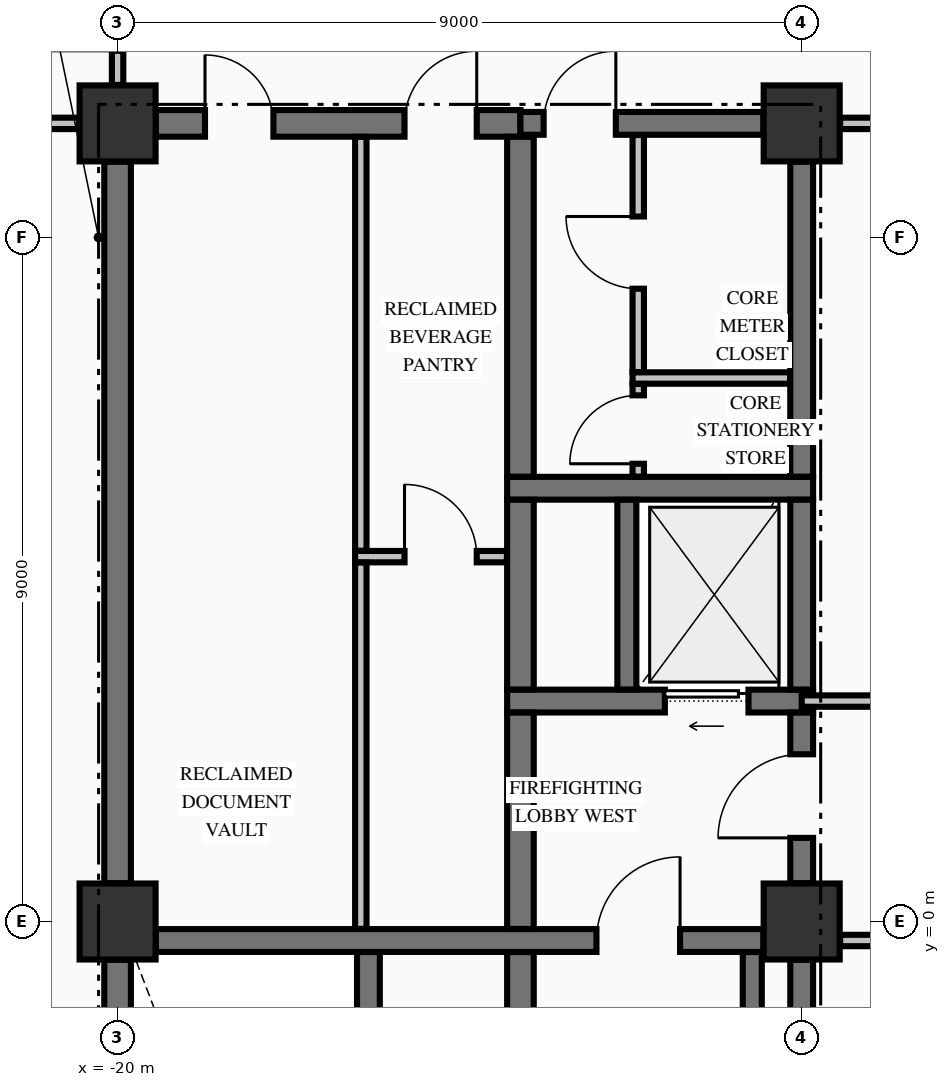
"""IFC4 building model, lengths in metres.
Left out: names, types, materials, properties, quantities, classifications, styles, units other than length and angle.
Written with IfcOpenShell. Run it as: python <this file> out.ifc"""

import sys

from ifc_helpers import new_model, si_unit, direction, frame, frame_2d, origin, origin_2d, place, context, subcontext, project, spatial, rectangle, extrude, element, fill, save


model = new_model("IFC4")
c1 = context("Model", 3, precision=1e-05, world=origin(), true_north=direction((0.0, 1.0)))
c2 = subcontext(c1, "Body", "Model", "MODEL_VIEW")
j1 = project(units=[si_unit("LENGTHUNIT", "METRE"), si_unit("PLANEANGLEUNIT", "RADIAN")], contexts=[c1])
p1 = place(None, origin())
s1 = spatial("IfcSite", under=j1, at=p1, CompositionType="ELEMENT")
p2 = place(p1, origin())
s2 = spatial("IfcBuilding", under=s1, at=p2, CompositionType="ELEMENT")
p3 = place(p2, frame((0.0, 0.0, 116.35)))
s3 = spatial("IfcBuildingStorey", under=s2, at=p3, CompositionType="ELEMENT", Elevation=116.35)
for number, where, z_axis, x_axis in (
    (1, (-20.0, 10.5, -0.425), (0.0, 0.0, 1.0), (1.0, 0.0, 0.0)),
    (2, (-11.0, 0.0, -0.425), (0.0, 0.0, 1.0), (1.0, 0.0, 0.0)),
    (3, (-11.0, 10.5, -0.425), (0.0, 0.0, 1.0), (1.0, 0.0, 0.0)),
    (4, (-20.0, 0.0, -0.425), (0.0, 0.0, 1.0), (1.0, 0.0, 0.0)),
):
    element("IfcColumn", number, at=place(p3, frame(where, z_axis=z_axis, x_axis=x_axis)), inside=s3, PredefinedType="COLUMN", context=c2, shape_type="SweptSolid", body=[
        extrude(rectangle(XDim=1.0, YDim=1.0, at=origin_2d()), origin(), (0.0, 0.0, 1.0), 5.0),
    ])
p4 = place(p3, frame((-19.496, -0.25, 0.0), z_axis=(0.0, 0.0, 1.0), x_axis=(1.0, 0.0, 0.0)))
e5 = element("IfcWall", 5, at=p4, inside=s3, PredefinedType="SHEAR", context=c2, shape_type="SweptSolid", body=[
    extrude(rectangle(XDim=7.992, YDim=0.3, at=frame_2d((3.996, 0.0))), origin(), (0.0, 0.0, 1.0), 4.575),
])
p5 = place(p4, frame((5.796, 0.0, 0.0)))
e6 = element("IfcOpeningElement", 6, at=p5, cuts=e5, PredefinedType="OPENING", context=c2, shape_type="SweptSolid", body=[
    extrude(rectangle(XDim=1.1, YDim=2.15, at=frame_2d((0.55, 1.075))), frame((0.0, 0.16, 0.0), z_axis=(0.0, -1.0, 0.0), x_axis=(1.0, 0.0, 0.0)), (0.0, 0.0, 1.0), 0.32),
])
p6 = place(p3, frame((-14.875, 2.9, 0.0), z_axis=(0.0, 0.0, 1.0), x_axis=(1.0, 0.0, 0.0)))
e7 = element("IfcWall", 7, at=p6, inside=s3, PredefinedType="SHEAR", context=c2, shape_type="SweptSolid", body=[
    extrude(rectangle(XDim=4.025, YDim=0.3, at=frame_2d((2.012, 0.0))), origin(), (0.0, 0.0, 1.0), 4.575),
])
p7 = place(p6, frame((2.075, 0.0, 0.0)))
e8 = element("IfcOpeningElement", 8, at=p7, cuts=e7, PredefinedType="OPENING", context=c2, shape_type="SweptSolid", body=[
    extrude(rectangle(XDim=1.1, YDim=2.2, at=frame_2d((0.55, 1.1))), frame((0.0, 0.16, 0.0), z_axis=(0.0, -1.0, 0.0), x_axis=(1.0, 0.0, 0.0)), (0.0, 0.0, 1.0), 0.32),
])
p8 = place(p3, frame((-14.875, 5.7, 0.0), z_axis=(0.0, 0.0, 1.0), x_axis=(1.0, 0.0, 0.0)))
e9 = element("IfcWall", 9, at=p8, inside=s3, PredefinedType="SHEAR", context=c2, shape_type="SweptSolid", body=[
    extrude(rectangle(XDim=4.025, YDim=0.3, at=frame_2d((2.012, 0.0))), origin(), (0.0, 0.0, 1.0), 4.575),
])
p9 = place(p3, frame((-19.496, 10.5, 0.0), z_axis=(0.0, 0.0, 1.0), x_axis=(1.0, 0.0, 0.0)))
e10 = element("IfcWall", 10, at=p9, inside=s3, PredefinedType="SHEAR", context=c2, shape_type="SweptSolid", body=[
    extrude(rectangle(XDim=4.796, YDim=0.35, at=frame_2d((2.398, 0.0))), origin(), (0.0, 0.0, 1.0), 4.575),
])
p10 = place(p9, frame((0.646, 0.0, 0.0)))
e11 = element("IfcOpeningElement", 11, at=p10, cuts=e10, PredefinedType="OPENING", context=c2, shape_type="SweptSolid", body=[
    extrude(rectangle(XDim=0.9, YDim=2.15, at=frame_2d((0.45, 1.075))), frame((0.0, 0.185, 0.0), z_axis=(0.0, -1.0, 0.0), x_axis=(1.0, 0.0, 0.0)), (0.0, 0.0, 1.0), 0.37),
])
p11 = place(p9, frame((3.271, 0.0, 0.0)))
e12 = element("IfcOpeningElement", 12, at=p11, cuts=e10, PredefinedType="OPENING", context=c2, shape_type="SweptSolid", body=[
    extrude(rectangle(XDim=0.95, YDim=2.15, at=frame_2d((0.475, 1.075))), frame((0.0, 0.185, 0.0), z_axis=(0.0, -1.0, 0.0), x_axis=(1.0, 0.0, 0.0)), (0.0, 0.0, 1.0), 0.37),
])
p12 = place(p3, frame((-14.7, 10.5, 0.0), z_axis=(0.0, 0.0, 1.0), x_axis=(1.0, 0.0, 0.0)))
e13 = element("IfcWall", 13, at=p12, inside=s3, PredefinedType="SHEAR", context=c2, shape_type="SweptSolid", body=[
    extrude(rectangle(XDim=3.196, YDim=0.3, at=frame_2d((1.598, 0.0))), origin(), (0.0, 0.0, 1.0), 4.575),
])
p13 = place(p12, frame((0.305, 0.0, 0.0)))
e14 = element("IfcOpeningElement", 14, at=p13, cuts=e13, PredefinedType="OPENING", context=c2, shape_type="SweptSolid", body=[
    extrude(rectangle(XDim=0.95, YDim=2.15, at=frame_2d((0.475, 1.075))), frame((0.0, 0.16, 0.0), z_axis=(0.0, -1.0, 0.0), x_axis=(1.0, 0.0, 0.0)), (0.0, 0.0, 1.0), 0.32),
])
p14 = place(p3, frame((-10.494, -0.25, 0.0), z_axis=(0.0, 0.0, 1.0), x_axis=(1.0, 0.0, 0.0)))
e15 = element("IfcWall", 15, at=p14, inside=s3, PredefinedType="PARTITIONING", context=c2, shape_type="SweptSolid", body=[
    extrude(rectangle(XDim=20.988, YDim=0.15, at=frame_2d((10.494, 0.0))), origin(), (0.0, 0.0, 1.0), 4.575),
])
p15 = place(p14, frame((15.394, 0.0, 0.0)))
e16 = element("IfcOpeningElement", 16, at=p15, cuts=e15, PredefinedType="OPENING", context=c2, shape_type="SweptSolid", body=[
    extrude(rectangle(XDim=1.1, YDim=2.15, at=frame_2d((0.55, 1.075))), frame((0.0, 0.085, 0.0), z_axis=(0.0, -1.0, 0.0), x_axis=(1.0, 0.0, 0.0)), (0.0, 0.0, 1.0), 0.17),
])
p16 = place(p14, frame((6.639, 0.0, 0.0)))
e17 = element("IfcOpeningElement", 17, at=p16, cuts=e15, PredefinedType="OPENING", context=c2, shape_type="SweptSolid", body=[
    extrude(rectangle(XDim=1.05, YDim=2.15, at=frame_2d((0.525, 1.075))), frame((0.0, 0.085, 0.0), z_axis=(0.0, -1.0, 0.0), x_axis=(1.0, 0.0, 0.0)), (0.0, 0.0, 1.0), 0.17),
])
p17 = place(p14, frame((18.799, 0.0, 0.0)))
e18 = element("IfcOpeningElement", 18, at=p17, cuts=e15, PredefinedType="OPENING", context=c2, shape_type="SweptSolid", body=[
    extrude(rectangle(XDim=0.95, YDim=2.15, at=frame_2d((0.475, 1.075))), frame((0.0, 0.085, 0.0), z_axis=(0.0, -1.0, 0.0), x_axis=(1.0, 0.0, 0.0)), (0.0, 0.0, 1.0), 0.17),
])
p18 = place(p3, frame((-11.0, 2.9, 0.0), z_axis=(0.0, 0.0, 1.0), x_axis=(1.0, 0.0, 0.0)))
e19 = element("IfcWall", 19, at=p18, inside=s3, PredefinedType="PARTITIONING", context=c2, shape_type="SweptSolid", body=[
    extrude(rectangle(XDim=22.0, YDim=0.15, at=frame_2d((11.0, 0.0))), origin(), (0.0, 0.0, 1.0), 4.575),
])
p19 = place(p18, frame((15.9, 0.0, 0.0)))
e20 = element("IfcOpeningElement", 20, at=p19, cuts=e19, PredefinedType="OPENING", context=c2, shape_type="SweptSolid", body=[
    extrude(rectangle(XDim=1.1, YDim=2.15, at=frame_2d((0.55, 1.075))), frame((0.0, 0.085, 0.0), z_axis=(0.0, -1.0, 0.0), x_axis=(1.0, 0.0, 0.0)), (0.0, 0.0, 1.0), 0.17),
])
p20 = place(p18, frame((7.145, 0.0, 0.0)))
e21 = element("IfcOpeningElement", 21, at=p20, cuts=e19, PredefinedType="OPENING", context=c2, shape_type="SweptSolid", body=[
    extrude(rectangle(XDim=1.05, YDim=2.15, at=frame_2d((0.525, 1.075))), frame((0.0, 0.085, 0.0), z_axis=(0.0, -1.0, 0.0), x_axis=(1.0, 0.0, 0.0)), (0.0, 0.0, 1.0), 0.17),
])
p21 = place(p18, frame((19.23, 0.0, 0.0)))
e22 = element("IfcOpeningElement", 22, at=p21, cuts=e19, PredefinedType="OPENING", context=c2, shape_type="SweptSolid", body=[
    extrude(rectangle(XDim=1.1, YDim=2.15, at=frame_2d((0.55, 1.075))), frame((0.0, 0.085, 0.0), z_axis=(0.0, -1.0, 0.0), x_axis=(1.0, 0.0, 0.0)), (0.0, 0.0, 1.0), 0.17),
])
p22 = place(p3, frame((-16.875, 4.8, 0.0), z_axis=(0.0, 0.0, 1.0), x_axis=(1.0, 0.0, 0.0)))
e23 = element("IfcWall", 23, at=p22, inside=s3, PredefinedType="PARTITIONING", context=c2, shape_type="SweptSolid", body=[
    extrude(rectangle(XDim=1.997, YDim=0.15, at=frame_2d((0.999, 0.0))), origin(), (0.0, 0.0, 1.0), 4.575),
])
p23 = place(p22, frame((0.65, 0.0, 0.0)))
e24 = element("IfcOpeningElement", 24, at=p23, cuts=e23, PredefinedType="OPENING", context=c2, shape_type="SweptSolid", body=[
    extrude(rectangle(XDim=0.95, YDim=2.15, at=frame_2d((0.475, 1.075))), frame((0.0, 0.085, 0.0), z_axis=(0.0, -1.0, 0.0), x_axis=(1.0, 0.0, 0.0)), (0.0, 0.0, 1.0), 0.17),
])
p24 = place(p3, frame((-13.225, 7.15, 0.0), z_axis=(0.0, 0.0, 1.0), x_axis=(1.0, 0.0, 0.0)))
e25 = element("IfcWall", 25, at=p24, inside=s3, PredefinedType="PARTITIONING", context=c2, shape_type="SweptSolid", body=[
    extrude(rectangle(XDim=2.072, YDim=0.15, at=frame_2d((1.036, 0.0))), origin(), (0.0, 0.0, 1.0), 4.575),
])
p25 = place(p3, frame((-22.835, 10.5, 0.0), z_axis=(0.0, 0.0, 1.0), x_axis=(1.0, 0.0, 0.0)))
e26 = element("IfcWall", 26, at=p25, inside=s3, PredefinedType="PARTITIONING", context=c2, shape_type="SweptSolid", body=[
    extrude(rectangle(XDim=2.329, YDim=0.15, at=frame_2d((1.165, 0.0))), origin(), (0.0, 0.0, 1.0), 4.575),
])
p26 = place(p25, frame((0.835, 0.0, 0.0)))
e27 = element("IfcOpeningElement", 27, at=p26, cuts=e26, PredefinedType="OPENING", context=c2, shape_type="SweptSolid", body=[
    extrude(rectangle(XDim=1.0, YDim=2.15, at=frame_2d((0.5, 1.075))), frame((0.0, 0.085, 0.0), z_axis=(0.0, -1.0, 0.0), x_axis=(1.0, 0.0, 0.0)), (0.0, 0.0, 1.0), 0.17),
])
p27 = place(p3, frame((-10.494, 10.5, 0.0), z_axis=(0.0, 0.0, 1.0), x_axis=(1.0, 0.0, 0.0)))
e28 = element("IfcWall", 28, at=p27, inside=s3, PredefinedType="PARTITIONING", context=c2, shape_type="SweptSolid", body=[
    extrude(rectangle(XDim=20.988, YDim=0.15, at=frame_2d((10.494, 0.0))), origin(), (0.0, 0.0, 1.0), 4.575),
])
p28 = place(p27, frame((15.394, 0.0, 0.0)))
e29 = element("IfcOpeningElement", 29, at=p28, cuts=e28, PredefinedType="OPENING", context=c2, shape_type="SweptSolid", body=[
    extrude(rectangle(XDim=1.1, YDim=2.15, at=frame_2d((0.55, 1.075))), frame((0.0, 0.085, 0.0), z_axis=(0.0, -1.0, 0.0), x_axis=(1.0, 0.0, 0.0)), (0.0, 0.0, 1.0), 0.17),
])
p29 = place(p3, frame((-20.0, -9.446, 0.0), z_axis=(0.0, 0.0, 1.0), x_axis=(0.0, 1.0, 0.0)))
e30 = element("IfcWall", 30, at=p29, inside=s3, PredefinedType="SHEAR", context=c2, shape_type="SweptSolid", body=[
    extrude(rectangle(XDim=8.942, YDim=0.35, at=frame_2d((4.471, 0.0))), origin(), (0.0, 0.0, 1.0), 4.575),
])
p30 = place(p3, frame((-20.0, 0.504, 0.0), z_axis=(0.0, 0.0, 1.0), x_axis=(0.0, 1.0, 0.0)))
e31 = element("IfcWall", 31, at=p30, inside=s3, PredefinedType="SHEAR", context=c2, shape_type="SweptSolid", body=[
    extrude(rectangle(XDim=9.492, YDim=0.35, at=frame_2d((4.746, 0.0))), origin(), (0.0, 0.0, 1.0), 4.575),
])
p31 = place(p3, frame((-16.7, -9.773, 0.0), z_axis=(0.0, 0.0, 1.0), x_axis=(0.0, 1.0, 0.0)))
e32 = element("IfcWall", 32, at=p31, inside=s3, PredefinedType="SHEAR", context=c2, shape_type="SweptSolid", body=[
    extrude(rectangle(XDim=9.371, YDim=0.3, at=frame_2d((4.686, 0.0))), origin(), (0.0, 0.0, 1.0), 4.575),
])
p32 = place(p3, frame((-14.7, -9.773, 0.0), z_axis=(0.0, 0.0, 1.0), x_axis=(0.0, 1.0, 0.0)))
e33 = element("IfcWall", 33, at=p32, inside=s3, PredefinedType="SHEAR", context=c2, shape_type="SweptSolid", body=[
    extrude(rectangle(XDim=9.371, YDim=0.35, at=frame_2d((4.686, 0.0))), origin(), (0.0, 0.0, 1.0), 4.575),
])
p33 = place(p3, frame((-14.7, -0.098, 0.0), z_axis=(0.0, 0.0, 1.0), x_axis=(0.0, 1.0, 0.0)))
e34 = element("IfcWall", 34, at=p33, inside=s3, PredefinedType="SHEAR", context=c2, shape_type="SweptSolid", body=[
    extrude(rectangle(XDim=2.846, YDim=0.35, at=frame_2d((1.423, 0.0))), origin(), (0.0, 0.0, 1.0), 4.575),
])
p34 = place(p3, frame((-14.7, 3.052, 0.0), z_axis=(0.0, 0.0, 1.0), x_axis=(0.0, 1.0, 0.0)))
e35 = element("IfcWall", 35, at=p34, inside=s3, PredefinedType="SHEAR", context=c2, shape_type="SweptSolid", body=[
    extrude(rectangle(XDim=2.496, YDim=0.35, at=frame_2d((1.248, 0.0))), origin(), (0.0, 0.0, 1.0), 4.575),
])
p35 = place(p3, frame((-14.7, 5.852, 0.0), z_axis=(0.0, 0.0, 1.0), x_axis=(0.0, 1.0, 0.0)))
e36 = element("IfcWall", 36, at=p35, inside=s3, PredefinedType="SHEAR", context=c2, shape_type="SweptSolid", body=[
    extrude(rectangle(XDim=4.471, YDim=0.35, at=frame_2d((2.235, 0.0))), origin(), (0.0, 0.0, 1.0), 4.575),
])
p36 = place(p3, frame((-13.3, 3.052, 0.0), z_axis=(0.0, 0.0, 1.0), x_axis=(0.0, 1.0, 0.0)))
e37 = element("IfcWall", 37, at=p36, inside=s3, PredefinedType="SOLIDWALL", context=c2, shape_type="SweptSolid", body=[
    extrude(rectangle(XDim=2.496, YDim=0.25, at=frame_2d((1.248, 0.0))), origin(), (0.0, 0.0, 1.0), 4.575),
])
p37 = place(p3, frame((-11.65, -9.798, 0.0), z_axis=(0.0, 0.0, 1.0), x_axis=(0.0, 1.0, 0.0)))
e38 = element("IfcWall", 38, at=p37, inside=s3, PredefinedType="SOLIDWALL", context=c2, shape_type="SweptSolid", body=[
    extrude(rectangle(XDim=9.396, YDim=0.25, at=frame_2d((4.698, 0.0))), origin(), (0.0, 0.0, 1.0), 4.575),
])
p38 = place(p3, frame((-11.0, -9.446, 0.0), z_axis=(0.0, 0.0, 1.0), x_axis=(0.0, 1.0, 0.0)))
e39 = element("IfcWall", 39, at=p38, inside=s3, PredefinedType="SHEAR", context=c2, shape_type="SweptSolid", body=[
    extrude(rectangle(XDim=8.942, YDim=0.3, at=frame_2d((4.471, 0.0))), origin(), (0.0, 0.0, 1.0), 4.575),
])
p39 = place(p3, frame((-11.0, 0.504, 0.0), z_axis=(0.0, 0.0, 1.0), x_axis=(0.0, 1.0, 0.0)))
e40 = element("IfcWall", 40, at=p39, inside=s3, PredefinedType="SHEAR", context=c2, shape_type="SweptSolid", body=[
    extrude(rectangle(XDim=2.244, YDim=0.3, at=frame_2d((1.122, 0.0))), origin(), (0.0, 0.0, 1.0), 4.575),
])
p40 = place(p39, frame((0.596, 0.0, 0.0)))
e41 = element("IfcOpeningElement", 41, at=p40, cuts=e40, PredefinedType="OPENING", context=c2, shape_type="SweptSolid", body=[
    extrude(rectangle(XDim=1.1, YDim=2.15, at=frame_2d((0.55, 1.075))), frame((0.0, 0.16, 0.0), z_axis=(0.0, -1.0, 0.0), x_axis=(1.0, 0.0, 0.0)), (0.0, 0.0, 1.0), 0.32),
])
p41 = place(p3, frame((-11.0, 3.052, 0.0), z_axis=(0.0, 0.0, 1.0), x_axis=(0.0, 1.0, 0.0)))
e42 = element("IfcWall", 42, at=p41, inside=s3, PredefinedType="SHEAR", context=c2, shape_type="SweptSolid", body=[
    extrude(rectangle(XDim=2.496, YDim=0.3, at=frame_2d((1.248, 0.0))), origin(), (0.0, 0.0, 1.0), 4.575),
])
p42 = place(p3, frame((-11.0, 5.852, 0.0), z_axis=(0.0, 0.0, 1.0), x_axis=(0.0, 1.0, 0.0)))
e43 = element("IfcWall", 43, at=p42, inside=s3, PredefinedType="SHEAR", context=c2, shape_type="SweptSolid", body=[
    extrude(rectangle(XDim=4.144, YDim=0.3, at=frame_2d((2.072, 0.0))), origin(), (0.0, 0.0, 1.0), 4.575),
])
p43 = place(p3, frame((-20.0, 11.006, 0.0), z_axis=(0.0, 0.0, 1.0), x_axis=(0.0, 1.0, 0.0)))
e44 = element("IfcWall", 44, at=p43, inside=s3, PredefinedType="PARTITIONING", context=c2, shape_type="SweptSolid", body=[
    extrude(rectangle(XDim=2.266, YDim=0.15, at=frame_2d((1.133, 0.0))), origin(), (0.0, 0.0, 1.0), 4.065),
])
p44 = place(p43, frame((0.449, 0.0, 0.0)))
e45 = element("IfcOpeningElement", 45, at=p44, cuts=e44, PredefinedType="OPENING", context=c2, shape_type="SweptSolid", body=[
    extrude(rectangle(XDim=0.95, YDim=2.02, at=frame_2d((0.475, 1.01))), frame((0.0, 0.085, 0.0), z_axis=(0.0, -1.0, 0.0), x_axis=(1.0, 0.0, 0.0)), (0.0, 0.0, 1.0), 0.17),
])
p45 = place(p3, frame((-16.8, -0.097, 0.0), z_axis=(0.0, 0.0, 1.0), x_axis=(0.0, 1.0, 0.0)))
e46 = element("IfcWall", 46, at=p45, inside=s3, PredefinedType="PARTITIONING", context=c2, shape_type="SweptSolid", body=[
    extrude(rectangle(XDim=4.819, YDim=0.15, at=frame_2d((2.409, 0.0))), origin(), (0.0, 0.0, 1.0), 4.575),
])
p46 = place(p3, frame((-16.8, 4.878, 0.0), z_axis=(0.0, 0.0, 1.0), x_axis=(0.0, 1.0, 0.0)))
e47 = element("IfcWall", 47, at=p46, inside=s3, PredefinedType="PARTITIONING", context=c2, shape_type="SweptSolid", body=[
    extrude(rectangle(XDim=5.444, YDim=0.15, at=frame_2d((2.722, 0.0))), origin(), (0.0, 0.0, 1.0), 4.575),
])
p47 = place(p3, frame((-13.15, 5.853, 0.0), z_axis=(0.0, 0.0, 1.0), x_axis=(0.0, 1.0, 0.0)))
e48 = element("IfcWall", 48, at=p47, inside=s3, PredefinedType="PARTITIONING", context=c2, shape_type="SweptSolid", body=[
    extrude(rectangle(XDim=1.219, YDim=0.15, at=frame_2d((0.609, 0.0))), origin(), (0.0, 0.0, 1.0), 4.575),
])
p48 = place(p47, frame((0.169, 0.0, 0.0)))
e49 = element("IfcOpeningElement", 49, at=p48, cuts=e48, PredefinedType="OPENING", context=c2, shape_type="SweptSolid", body=[
    extrude(rectangle(XDim=0.9, YDim=2.15, at=frame_2d((0.45, 1.075))), frame((0.0, 0.085, 0.0), z_axis=(0.0, -1.0, 0.0), x_axis=(1.0, 0.0, 0.0)), (0.0, 0.0, 1.0), 0.17),
])
p49 = place(p3, frame((-13.15, 7.228, 0.0), z_axis=(0.0, 0.0, 1.0), x_axis=(0.0, 1.0, 0.0)))
e50 = element("IfcWall", 50, at=p49, inside=s3, PredefinedType="PARTITIONING", context=c2, shape_type="SweptSolid", body=[
    extrude(rectangle(XDim=3.119, YDim=0.15, at=frame_2d((1.56, 0.0))), origin(), (0.0, 0.0, 1.0), 4.575),
])
p50 = place(p49, frame((1.097, 0.0, 0.0)))
e51 = element("IfcOpeningElement", 51, at=p50, cuts=e50, PredefinedType="OPENING", context=c2, shape_type="SweptSolid", body=[
    extrude(rectangle(XDim=0.95, YDim=2.15, at=frame_2d((0.475, 1.075))), frame((0.0, 0.085, 0.0), z_axis=(0.0, -1.0, 0.0), x_axis=(1.0, 0.0, 0.0)), (0.0, 0.0, 1.0), 0.17),
])
p51 = place(p5, origin())
e52 = element("IfcDoor", 52, at=p51, inside=s3, OperationType="SINGLE_SWING_RIGHT", PredefinedType="DOOR", context=c2, shape_type="SweptSolid", body=[
    extrude(rectangle(XDim=1.1, YDim=2.15, at=frame_2d((0.55, 1.075))), frame((0.0, 0.025, 0.0), z_axis=(0.0, -1.0, 0.0), x_axis=(1.0, 0.0, 0.0)), (0.0, 0.0, 1.0), 0.05),
])
fill(e6, e52)
p52 = place(p40, origin())
e53 = element("IfcDoor", 53, at=p52, inside=s3, OperationType="SINGLE_SWING_LEFT", PredefinedType="DOOR", context=c2, shape_type="SweptSolid", body=[
    extrude(rectangle(XDim=1.1, YDim=2.15, at=frame_2d((0.55, 1.075))), frame((0.0, 0.025, 0.0), z_axis=(0.0, -1.0, 0.0), x_axis=(1.0, 0.0, 0.0)), (0.0, 0.0, 1.0), 0.05),
])
fill(e41, e53)
p53 = place(p7, origin())
e54 = element("IfcDoor", 54, at=p53, inside=s3, OperationType="SLIDING_TO_LEFT", PredefinedType="DOOR", context=c2, shape_type="SweptSolid", body=[
    extrude(rectangle(XDim=1.1, YDim=2.2, at=frame_2d((0.55, 1.1))), frame((0.0, 0.025, 0.0), z_axis=(0.0, -1.0, 0.0), x_axis=(1.0, 0.0, 0.0)), (0.0, 0.0, 1.0), 0.05),
])
fill(e8, e54)
p54 = place(p13, origin())
e55 = element("IfcDoor", 55, at=p54, inside=s3, OperationType="SINGLE_SWING_RIGHT", PredefinedType="DOOR", context=c2, shape_type="SweptSolid", body=[
    extrude(rectangle(XDim=0.95, YDim=2.15, at=frame_2d((0.475, 1.075))), frame((0.0, 0.025, 0.0), z_axis=(0.0, -1.0, 0.0), x_axis=(1.0, 0.0, 0.0)), (0.0, 0.0, 1.0), 0.05),
])
fill(e14, e55)
p55 = place(p48, origin())
e56 = element("IfcDoor", 56, at=p55, inside=s3, OperationType="SINGLE_SWING_LEFT", PredefinedType="DOOR", context=c2, shape_type="SweptSolid", body=[
    extrude(rectangle(XDim=0.9, YDim=2.15, at=frame_2d((0.45, 1.075))), frame((0.0, 0.025, 0.0), z_axis=(0.0, -1.0, 0.0), x_axis=(1.0, 0.0, 0.0)), (0.0, 0.0, 1.0), 0.05),
])
fill(e49, e56)
p56 = place(p50, origin())
e57 = element("IfcDoor", 57, at=p56, inside=s3, OperationType="SINGLE_SWING_RIGHT", PredefinedType="DOOR", context=c2, shape_type="SweptSolid", body=[
    extrude(rectangle(XDim=0.95, YDim=2.15, at=frame_2d((0.475, 1.075))), frame((0.0, 0.025, 0.0), z_axis=(0.0, -1.0, 0.0), x_axis=(1.0, 0.0, 0.0)), (0.0, 0.0, 1.0), 0.05),
])
fill(e51, e57)
p57 = place(p10, origin())
e58 = element("IfcDoor", 58, at=p57, inside=s3, OperationType="SINGLE_SWING_LEFT", PredefinedType="DOOR", context=c2, shape_type="SweptSolid", body=[
    extrude(rectangle(XDim=0.9, YDim=2.15, at=frame_2d((0.45, 1.075))), frame((0.0, 0.025, 0.0), z_axis=(0.0, -1.0, 0.0), x_axis=(1.0, 0.0, 0.0)), (0.0, 0.0, 1.0), 0.05),
])
fill(e11, e58)
p58 = place(p11, origin())
e59 = element("IfcDoor", 59, at=p58, inside=s3, OperationType="SINGLE_SWING_RIGHT", PredefinedType="DOOR", context=c2, shape_type="SweptSolid", body=[
    extrude(rectangle(XDim=0.95, YDim=2.15, at=frame_2d((0.475, 1.075))), frame((0.0, 0.025, 0.0), z_axis=(0.0, -1.0, 0.0), x_axis=(1.0, 0.0, 0.0)), (0.0, 0.0, 1.0), 0.05),
])
fill(e12, e59)
p59 = place(p23, origin())
e60 = element("IfcDoor", 60, at=p59, inside=s3, OperationType="SINGLE_SWING_LEFT", PredefinedType="DOOR", context=c2, shape_type="SweptSolid", body=[
    extrude(rectangle(XDim=0.95, YDim=2.15, at=frame_2d((0.475, 1.075))), frame((0.0, 0.025, 0.0), z_axis=(0.0, -1.0, 0.0), x_axis=(1.0, 0.0, 0.0)), (0.0, 0.0, 1.0), 0.05),
])
fill(e24, e60)
save(model, sys.argv[1])
